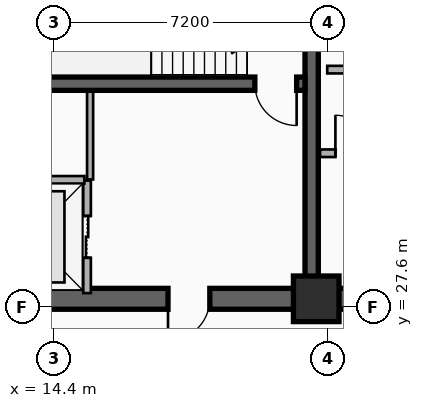
"""IFC4 building model, lengths in metres.
Left out: names, types, materials, properties, quantities, classifications, styles, units other than length and angle.
Written with IfcOpenShell. Run it as: python <this file> out.ifc"""

import sys

from ifc_helpers import new_model, si_unit, direction, frame, frame_2d, origin, origin_2d, place, context, subcontext, project, spatial, rectangle, extrude, element, fill, save


model = new_model("IFC4")
c1 = context("Model", 3, precision=1e-05, world=origin(), true_north=direction((0.0, 1.0)))
c2 = subcontext(c1, "Body", "Model", "MODEL_VIEW")
j1 = project(units=[si_unit("LENGTHUNIT", "METRE"), si_unit("PLANEANGLEUNIT", "RADIAN")], contexts=[c1])
p1 = place(None, origin())
s1 = spatial("IfcSite", under=j1, at=p1, CompositionType="ELEMENT")
p2 = place(p1, origin())
s2 = spatial("IfcBuilding", under=s1, at=p2, CompositionType="ELEMENT")
p3 = place(p2, frame((0.0, 0.0, 151.9)))
s3 = spatial("IfcBuildingStorey", under=s2, at=p3, CompositionType="ELEMENT", Elevation=151.9)
p4 = place(p3, frame((21.18, 27.82, 0.0), z_axis=(0.0, 0.0, 1.0), x_axis=(-1.0, 0.0, 0.0)))
e1 = element("IfcWall", 1, at=p4, inside=s3, PredefinedType="SHEAR", context=c2, shape_type="SweptSolid", body=[
    extrude(rectangle(XDim=9.03, YDim=0.55, at=frame_2d((4.515, 0.0))), origin(), (0.0, 0.0, 1.0), 3.55),
])
p5 = place(p4, frame((2.68, 0.0, 0.0)))
e2 = element("IfcOpeningElement", 2, at=p5, cuts=e1, PredefinedType="OPENING", context=c2, shape_type="SweptSolid", body=[
    extrude(rectangle(XDim=1.1, YDim=2.15, at=frame_2d((0.55, 1.075))), frame((0.0, 0.285, 0.0), z_axis=(0.0, -1.0, 0.0), x_axis=(1.0, 0.0, 0.0)), (0.0, 0.0, 1.0), 0.57),
])
p6 = place(p3, frame((33.15, 27.82, 0.0), z_axis=(0.0, 0.0, 1.0), x_axis=(-1.0, 0.0, 0.0)))
e3 = element("IfcWall", 3, at=p6, inside=s3, PredefinedType="SHEAR", context=c2, shape_type="SweptSolid", body=[
    extrude(rectangle(XDim=11.97, YDim=0.55, at=frame_2d((5.985, 0.0))), origin(), (0.0, 0.0, 1.0), 3.55),
])
p7 = place(p6, frame((6.1, 0.0, 0.0)))
e4 = element("IfcOpeningElement", 4, at=p7, cuts=e3, PredefinedType="OPENING", context=c2, shape_type="SweptSolid", body=[
    extrude(rectangle(XDim=1.6, YDim=2.2, at=frame_2d((0.8, 1.1))), frame((0.0, 0.285, 0.0), z_axis=(0.0, -1.0, 0.0), x_axis=(1.0, 0.0, 0.0)), (0.0, 0.0, 1.0), 0.57),
])
p8 = place(p3, frame((21.18, 28.095, 0.0), z_axis=(0.0, 0.0, 1.0), x_axis=(0.0, 1.0, 0.0)))
e5 = element("IfcWall", 5, at=p8, inside=s3, PredefinedType="SHEAR", context=c2, shape_type="SweptSolid", body=[
    extrude(rectangle(XDim=8.68, YDim=0.35, at=frame_2d((4.34, 0.0))), origin(), (0.0, 0.0, 1.0), 3.55),
])
p9 = place(p3, frame((21.005, 33.48, 0.0), z_axis=(0.0, 0.0, 1.0), x_axis=(-1.0, 0.0, 0.0)))
e6 = element("IfcWall", 6, at=p9, inside=s3, PredefinedType="SHEAR", context=c2, shape_type="SweptSolid", body=[
    extrude(rectangle(XDim=8.58, YDim=0.35, at=frame_2d((4.29, 0.0))), origin(), (0.0, 0.0, 1.0), 3.55),
])
p10 = place(p9, frame((0.22, 0.0, 0.0)))
e7 = element("IfcOpeningElement", 7, at=p10, cuts=e6, PredefinedType="OPENING", context=c2, shape_type="SweptSolid", body=[
    extrude(rectangle(XDim=1.1, YDim=2.15, at=frame_2d((0.55, 1.075))), frame((0.0, 0.185, 0.0), z_axis=(0.0, -1.0, 0.0), x_axis=(1.0, 0.0, 0.0)), (0.0, 0.0, 1.0), 0.37),
])
p11 = place(p3, frame((21.3, 27.82, 0.0), z_axis=(0.0, 0.0, 1.0), x_axis=(1.0, 0.0, 0.0)))
e8 = element("IfcColumn", 8, at=p11, inside=s3, PredefinedType="COLUMN", context=c2, shape_type="SweptSolid", body=[
    extrude(rectangle(XDim=1.2, YDim=1.2, at=origin_2d()), origin(), (0.0, 0.0, 1.0), 3.55),
])
p12 = place(p3, frame((15.27, 27.97, 0.0), z_axis=(0.0, 0.0, 1.0), x_axis=(0.0, 1.0, 0.0)))
e9 = element("IfcWall", 9, at=p12, inside=s3, PredefinedType="PARTITIONING", context=c2, shape_type="SweptSolid", body=[
    extrude(rectangle(XDim=2.96, YDim=0.2, at=frame_2d((1.48, 0.0))), origin(), (0.0, 0.0, 1.0), 2.36),
])
p13 = place(p12, frame((0.93, 0.0, 0.0)))
e10 = element("IfcOpeningElement", 10, at=p13, cuts=e9, PredefinedType="OPENING", context=c2, shape_type="SweptSolid", body=[
    extrude(rectangle(XDim=1.1, YDim=2.15, at=frame_2d((0.55, 1.075))), frame((0.0, 0.11, 0.0), z_axis=(0.0, -1.0, 0.0), x_axis=(1.0, 0.0, 0.0)), (0.0, 0.0, 1.0), 0.22),
])
p14 = place(p3, frame((12.45, 30.95, 0.0), z_axis=(0.0, 0.0, 1.0), x_axis=(1.0, 0.0, 0.0)))
e11 = element("IfcWall", 11, at=p14, inside=s3, PredefinedType="PARTITIONING", context=c2, shape_type="SweptSolid", body=[
    extrude(rectangle(XDim=2.75, YDim=0.2, at=frame_2d((1.375, 0.0))), origin(), (0.0, 0.0, 1.0), 2.36),
])
p15 = place(p3, frame((21.4, 31.65, 0.0), z_axis=(0.0, 0.0, 1.0), x_axis=(1.0, 0.0, 0.0)))
e12 = element("IfcWall", 12, at=p15, inside=s3, PredefinedType="PARTITIONING", context=c2, shape_type="SweptSolid", body=[
    extrude(rectangle(XDim=1.81, YDim=0.2, at=frame_2d((0.905, 0.0))), origin(), (0.0, 0.0, 1.0), 2.36),
])
p16 = place(p15, frame((0.405, 0.0, 0.0)))
e13 = element("IfcOpeningElement", 13, at=p16, cuts=e12, PredefinedType="OPENING", context=c2, shape_type="SweptSolid", body=[
    extrude(rectangle(XDim=1.0, YDim=2.15, at=frame_2d((0.5, 1.075))), frame((0.0, 0.11, 0.0), z_axis=(0.0, -1.0, 0.0), x_axis=(1.0, 0.0, 0.0)), (0.0, 0.0, 1.0), 0.22),
])
p17 = place(p3, frame((21.59, 33.85, 0.0), z_axis=(0.0, 0.0, 1.0), x_axis=(1.0, 0.0, 0.0)))
e14 = element("IfcWall", 14, at=p17, inside=s3, PredefinedType="PARTITIONING", context=c2, shape_type="SweptSolid", body=[
    extrude(rectangle(XDim=5.92, YDim=0.2, at=frame_2d((2.96, 0.0))), origin(), (0.0, 0.0, 1.0), 2.36),
])
p18 = place(p17, frame((2.36, 0.0, 0.0)))
e15 = element("IfcOpeningElement", 15, at=p18, cuts=e14, PredefinedType="OPENING", context=c2, shape_type="SweptSolid", body=[
    extrude(rectangle(XDim=1.2, YDim=2.15, at=frame_2d((0.6, 1.075))), frame((0.0, 0.11, 0.0), z_axis=(0.0, -1.0, 0.0), x_axis=(1.0, 0.0, 0.0)), (0.0, 0.0, 1.0), 0.22),
])
p19 = place(p3, frame((15.35, 30.96, 0.0), z_axis=(0.0, 0.0, 1.0), x_axis=(0.0, 1.0, 0.0)))
e16 = element("IfcWall", 16, at=p19, inside=s3, PredefinedType="PARTITIONING", context=c2, shape_type="SweptSolid", body=[
    extrude(rectangle(XDim=2.31, YDim=0.16, at=frame_2d((1.155, 0.0))), origin(), (0.0, 0.0, 1.0), 3.29),
])
p20 = place(p13, origin())
e17 = element("IfcDoor", 17, at=p20, inside=s3, OperationType="DOUBLE_DOOR_SLIDING", PredefinedType="DOOR", context=c2, shape_type="SweptSolid", body=[
    extrude(rectangle(XDim=1.1, YDim=2.15, at=frame_2d((0.55, 1.075))), frame((0.0, 0.025, 0.0), z_axis=(0.0, -1.0, 0.0), x_axis=(1.0, 0.0, 0.0)), (0.0, 0.0, 1.0), 0.05),
])
fill(e10, e17)
p21 = place(p10, origin())
e18 = element("IfcDoor", 18, at=p21, inside=s3, OperationType="SINGLE_SWING_LEFT", PredefinedType="DOOR", context=c2, shape_type="SweptSolid", body=[
    extrude(rectangle(XDim=1.1, YDim=2.15, at=frame_2d((0.55, 1.075))), frame((0.0, 0.025, 0.0), z_axis=(0.0, -1.0, 0.0), x_axis=(1.0, 0.0, 0.0)), (0.0, 0.0, 1.0), 0.05),
])
fill(e7, e18)
p22 = place(p5, origin())
e19 = element("IfcDoor", 19, at=p22, inside=s3, OperationType="SINGLE_SWING_RIGHT", PredefinedType="DOOR", context=c2, shape_type="SweptSolid", body=[
    extrude(rectangle(XDim=1.1, YDim=2.15, at=frame_2d((0.55, 1.075))), frame((0.0, 0.025, 0.0), z_axis=(0.0, -1.0, 0.0), x_axis=(1.0, 0.0, 0.0)), (0.0, 0.0, 1.0), 0.05),
])
fill(e2, e19)
p23 = place(p16, origin())
e20 = element("IfcDoor", 20, at=p23, inside=s3, OperationType="SINGLE_SWING_LEFT", PredefinedType="DOOR", context=c2, shape_type="SweptSolid", body=[
    extrude(rectangle(XDim=1.0, YDim=2.15, at=frame_2d((0.5, 1.075))), frame((0.0, 0.025, 0.0), z_axis=(0.0, -1.0, 0.0), x_axis=(1.0, 0.0, 0.0)), (0.0, 0.0, 1.0), 0.05),
])
fill(e13, e20)
save(model, sys.argv[1])
